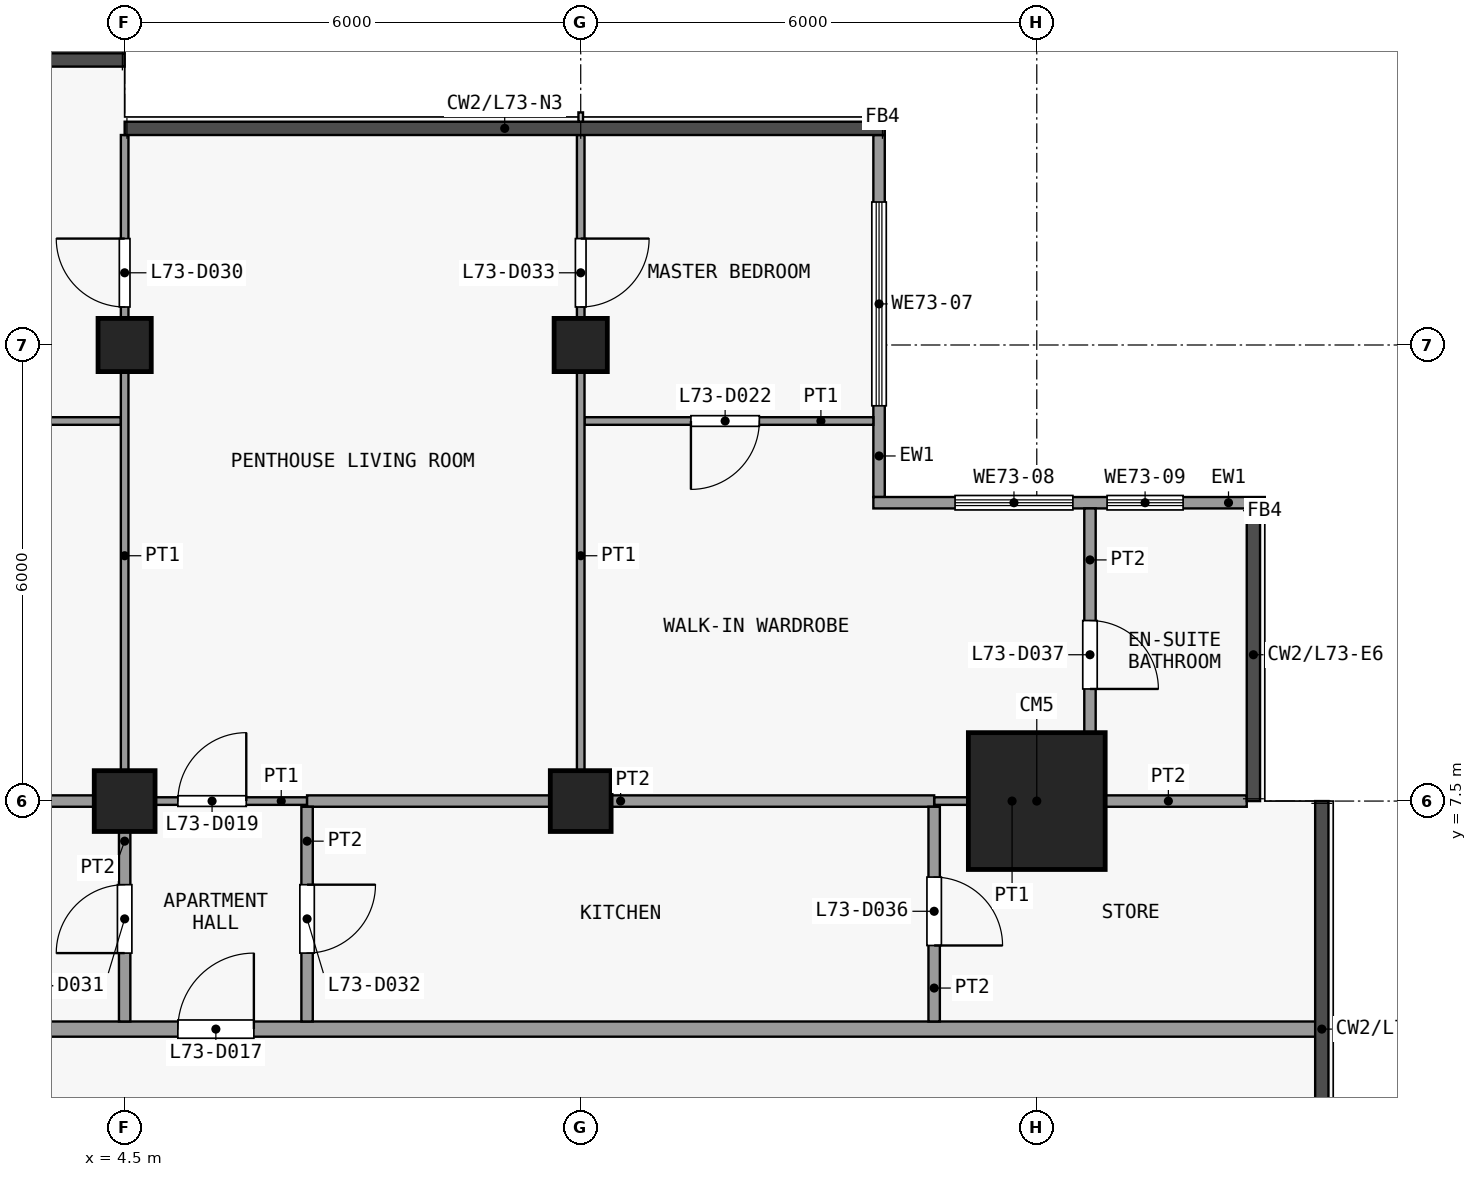
"""IFC4 building model, lengths in metres.
Left out: names, types, materials, properties, quantities, classifications, styles, units other than length and angle.
Written with IfcOpenShell. Run it as: python <this file> out.ifc"""

import sys

from ifc_helpers import new_model, si_unit, direction, frame, frame_2d, origin, origin_2d, place, context, subcontext, project, spatial, rectangle, extrude, element, fill, save


model = new_model("IFC4")
c1 = context("Model", 3, precision=1e-05, world=origin(), true_north=direction((0.0, 1.0)))
c2 = subcontext(c1, "Body", "Model", "MODEL_VIEW")
j1 = project(units=[si_unit("LENGTHUNIT", "METRE"), si_unit("PLANEANGLEUNIT", "RADIAN")], contexts=[c1])
p1 = place(None, origin())
s1 = spatial("IfcSite", under=j1, at=p1, CompositionType="ELEMENT")
p2 = place(p1, origin())
s2 = spatial("IfcBuilding", under=s1, at=p2, CompositionType="ELEMENT")
p3 = place(p2, frame((0.0, 0.0, 287.9)))
s3 = spatial("IfcBuildingStorey", under=s2, at=p3, CompositionType="ELEMENT", Elevation=287.9)
p4 = place(p3, frame((4.5, 7.5, 0.0), z_axis=(0.0, 0.0, 1.0), x_axis=(1.0, 0.0, 0.0)))
e1 = element("IfcColumn", 1, at=p4, inside=s3, PredefinedType="COLUMN", context=c2, shape_type="SweptSolid", body=[
    extrude(rectangle(XDim=0.8, YDim=0.8, at=origin_2d()), origin(), (0.0, 0.0, 1.0), 3.6),
])
p5 = place(p3, frame((4.5, 13.5, 0.0), z_axis=(0.0, 0.0, 1.0), x_axis=(1.0, 0.0, 0.0)))
e2 = element("IfcColumn", 2, at=p5, inside=s3, PredefinedType="COLUMN", context=c2, shape_type="SweptSolid", body=[
    extrude(rectangle(XDim=0.7, YDim=0.7, at=origin_2d()), origin(), (0.0, 0.0, 1.0), 3.6),
])
p6 = place(p3, frame((10.5, 7.5, 0.0), z_axis=(0.0, 0.0, 1.0), x_axis=(1.0, 0.0, 0.0)))
e3 = element("IfcColumn", 3, at=p6, inside=s3, PredefinedType="COLUMN", context=c2, shape_type="SweptSolid", body=[
    extrude(rectangle(XDim=0.8, YDim=0.8, at=origin_2d()), origin(), (0.0, 0.0, 1.0), 3.6),
])
p7 = place(p3, frame((10.5, 13.5, 0.0), z_axis=(0.0, 0.0, 1.0), x_axis=(1.0, 0.0, 0.0)))
e4 = element("IfcColumn", 4, at=p7, inside=s3, PredefinedType="COLUMN", context=c2, shape_type="SweptSolid", body=[
    extrude(rectangle(XDim=0.7, YDim=0.7, at=origin_2d()), origin(), (0.0, 0.0, 1.0), 3.6),
])
p8 = place(p3, frame((16.5, 7.5, 0.0), z_axis=(0.0, 0.0, 1.0), x_axis=(1.0, 0.0, 0.0)))
e5 = element("IfcColumn", 5, at=p8, inside=s3, PredefinedType="COLUMN", context=c2, shape_type="SweptSolid", body=[
    extrude(rectangle(XDim=1.8, YDim=1.8, at=origin_2d()), origin(), (0.0, 0.0, 1.0), 3.6),
])
p9 = place(p3, frame((14.425, 16.262, 0.0), z_axis=(0.0, 0.0, 1.0), x_axis=(0.0, -1.0, 0.0)))
e6 = element("IfcWall", 6, at=p9, inside=s3, PredefinedType="SOLIDWALL", context=c2, shape_type="SweptSolid", body=[
    extrude(rectangle(XDim=4.762, YDim=0.15, at=frame_2d((2.381, 0.0))), origin(), (0.0, 0.0, 1.0), 3.3),
])
p10 = place(p9, frame((0.881, 0.0, 0.9)))
e7 = element("IfcOpeningElement", 7, at=p10, cuts=e6, PredefinedType="OPENING", context=c2, shape_type="SweptSolid", body=[
    extrude(rectangle(XDim=2.681, YDim=2.4, at=frame_2d((1.34, 1.2))), frame((0.0, 0.085, 0.0), z_axis=(0.0, -1.0, 0.0), x_axis=(1.0, 0.0, 0.0)), (0.0, 0.0, 1.0), 0.17),
])
p11 = place(p3, frame((14.35, 11.425, 0.0), z_axis=(0.0, 0.0, 1.0), x_axis=(1.0, 0.0, 0.0)))
e8 = element("IfcWall", 8, at=p11, inside=s3, PredefinedType="SOLIDWALL", context=c2, shape_type="SweptSolid", body=[
    extrude(rectangle(XDim=5.15, YDim=0.15, at=frame_2d((2.575, 0.0))), origin(), (0.0, 0.0, 1.0), 3.3),
])
p12 = place(p11, frame((1.075, 0.0, 0.9)))
e9 = element("IfcOpeningElement", 9, at=p12, cuts=e8, PredefinedType="OPENING", context=c2, shape_type="SweptSolid", body=[
    extrude(rectangle(XDim=1.55, YDim=2.4, at=frame_2d((0.775, 1.2))), frame((0.0, 0.085, 0.0), z_axis=(0.0, -1.0, 0.0), x_axis=(1.0, 0.0, 0.0)), (0.0, 0.0, 1.0), 0.17),
])
p13 = place(p11, frame((3.075, 0.0, 0.9)))
e10 = element("IfcOpeningElement", 10, at=p13, cuts=e8, PredefinedType="OPENING", context=c2, shape_type="SweptSolid", body=[
    extrude(rectangle(XDim=1.0, YDim=2.4, at=frame_2d((0.5, 1.2))), frame((0.0, 0.085, 0.0), z_axis=(0.0, -1.0, 0.0), x_axis=(1.0, 0.0, 0.0)), (0.0, 0.0, 1.0), 0.17),
])
p14 = place(p3, frame((-19.35, 4.5, 0.0), z_axis=(0.0, 0.0, 1.0), x_axis=(1.0, 0.0, 0.0)))
e11 = element("IfcWall", 11, at=p14, inside=s3, PredefinedType="PARTITIONING", context=c2, shape_type="SweptSolid", body=[
    extrude(rectangle(XDim=39.6, YDim=0.2, at=frame_2d((19.8, 0.0))), origin(), (0.0, 0.0, 1.0), 3.3),
])
p15 = place(p14, frame((7.05, 0.0, 0.0)))
e12 = element("IfcOpeningElement", 12, at=p15, cuts=e11, PredefinedType="OPENING", context=c2, shape_type="SweptSolid", body=[
    extrude(rectangle(XDim=1.0, YDim=2.1, at=frame_2d((0.5, 1.05))), frame((0.0, 0.11, 0.0), z_axis=(0.0, -1.0, 0.0), x_axis=(1.0, 0.0, 0.0)), (0.0, 0.0, 1.0), 0.22),
])
p16 = place(p14, frame((24.55, 0.0, 0.0)))
e13 = element("IfcOpeningElement", 13, at=p16, cuts=e11, PredefinedType="OPENING", context=c2, shape_type="SweptSolid", body=[
    extrude(rectangle(XDim=1.0, YDim=2.1, at=frame_2d((0.5, 1.05))), frame((0.0, 0.11, 0.0), z_axis=(0.0, -1.0, 0.0), x_axis=(1.0, 0.0, 0.0)), (0.0, 0.0, 1.0), 0.22),
])
p17 = place(p3, frame((4.5, 7.5, 0.0), z_axis=(0.0, 0.0, 1.0), x_axis=(1.0, 0.0, 0.0)))
e14 = element("IfcWall", 14, at=p17, inside=s3, PredefinedType="PARTITIONING", context=c2, shape_type="SweptSolid", body=[
    extrude(rectangle(XDim=2.4, YDim=0.1, at=frame_2d((1.2, 0.0))), origin(), (0.0, 0.0, 1.0), 3.3),
])
p18 = place(p17, frame((0.7, 0.0, 0.0)))
e15 = element("IfcOpeningElement", 15, at=p18, cuts=e14, PredefinedType="OPENING", context=c2, shape_type="SweptSolid", body=[
    extrude(rectangle(XDim=0.9, YDim=2.1, at=frame_2d((0.45, 1.05))), frame((0.0, 0.06, 0.0), z_axis=(0.0, -1.0, 0.0), x_axis=(1.0, 0.0, 0.0)), (0.0, 0.0, 1.0), 0.12),
])
p19 = place(p3, frame((15.15, 7.5, 0.0), z_axis=(0.0, 0.0, 1.0), x_axis=(1.0, 0.0, 0.0)))
e16 = element("IfcWall", 16, at=p19, inside=s3, PredefinedType="PARTITIONING", context=c2, shape_type="SweptSolid", body=[
    extrude(rectangle(XDim=2.05, YDim=0.1, at=frame_2d((1.025, 0.0))), origin(), (0.0, 0.0, 1.0), 3.3),
])
p20 = place(p3, frame((0.0, 7.5, 0.0), z_axis=(0.0, 0.0, 1.0), x_axis=(1.0, 0.0, 0.0)))
e17 = element("IfcWall", 17, at=p20, inside=s3, PredefinedType="PARTITIONING", context=c2, shape_type="SweptSolid", body=[
    extrude(rectangle(XDim=4.5, YDim=0.15, at=frame_2d((2.25, 0.0))), origin(), (0.0, 0.0, 1.0), 3.3),
])
p21 = place(p3, frame((6.9, 7.5, 0.0), z_axis=(0.0, 0.0, 1.0), x_axis=(1.0, 0.0, 0.0)))
e18 = element("IfcWall", 18, at=p21, inside=s3, PredefinedType="PARTITIONING", context=c2, shape_type="SweptSolid", body=[
    extrude(rectangle(XDim=8.25, YDim=0.15, at=frame_2d((4.125, 0.0))), origin(), (0.0, 0.0, 1.0), 3.3),
])
p22 = place(p3, frame((17.2, 7.5, 0.0), z_axis=(0.0, 0.0, 1.0), x_axis=(1.0, 0.0, 0.0)))
e19 = element("IfcWall", 19, at=p22, inside=s3, PredefinedType="PARTITIONING", context=c2, shape_type="SweptSolid", body=[
    extrude(rectangle(XDim=2.062, YDim=0.15, at=frame_2d((1.031, 0.0))), origin(), (0.0, 0.0, 1.0), 3.3),
])
p23 = place(p3, frame((-4.4, 12.5, 0.0), z_axis=(0.0, 0.0, 1.0), x_axis=(1.0, 0.0, 0.0)))
e20 = element("IfcWall", 20, at=p23, inside=s3, PredefinedType="PARTITIONING", context=c2, shape_type="SweptSolid", body=[
    extrude(rectangle(XDim=8.85, YDim=0.1, at=frame_2d((4.425, 0.0))), origin(), (0.0, 0.0, 1.0), 3.3),
])
p24 = place(p23, frame((4.0, 0.0, 0.0)))
e21 = element("IfcOpeningElement", 21, at=p24, cuts=e20, PredefinedType="OPENING", context=c2, shape_type="SweptSolid", body=[
    extrude(rectangle(XDim=0.9, YDim=2.1, at=frame_2d((0.45, 1.05))), frame((0.0, 0.06, 0.0), z_axis=(0.0, -1.0, 0.0), x_axis=(1.0, 0.0, 0.0)), (0.0, 0.0, 1.0), 0.12),
])
p25 = place(p3, frame((10.55, 12.5, 0.0), z_axis=(0.0, 0.0, 1.0), x_axis=(1.0, 0.0, 0.0)))
e22 = element("IfcWall", 22, at=p25, inside=s3, PredefinedType="PARTITIONING", context=c2, shape_type="SweptSolid", body=[
    extrude(rectangle(XDim=3.8, YDim=0.1, at=frame_2d((1.9, 0.0))), origin(), (0.0, 0.0, 1.0), 3.3),
])
p26 = place(p25, frame((1.4, 0.0, 0.0)))
e23 = element("IfcOpeningElement", 23, at=p26, cuts=e22, PredefinedType="OPENING", context=c2, shape_type="SweptSolid", body=[
    extrude(rectangle(XDim=0.9, YDim=2.1, at=frame_2d((0.45, 1.05))), frame((0.0, 0.06, 0.0), z_axis=(0.0, -1.0, 0.0), x_axis=(1.0, 0.0, 0.0)), (0.0, 0.0, 1.0), 0.12),
])
p27 = place(p3, frame((4.5, 7.575, 0.0), z_axis=(0.0, 0.0, 1.0), x_axis=(0.0, 1.0, 0.0)))
e24 = element("IfcWall", 24, at=p27, inside=s3, PredefinedType="PARTITIONING", context=c2, shape_type="SweptSolid", body=[
    extrude(rectangle(XDim=8.688, YDim=0.1, at=frame_2d((4.344, 0.0))), origin(), (0.0, 0.0, 1.0), 3.3),
])
p28 = place(p27, frame((6.425, 0.0, 0.0)))
e25 = element("IfcOpeningElement", 25, at=p28, cuts=e24, PredefinedType="OPENING", context=c2, shape_type="SweptSolid", body=[
    extrude(rectangle(XDim=0.9, YDim=2.1, at=frame_2d((0.45, 1.05))), frame((0.0, 0.06, 0.0), z_axis=(0.0, -1.0, 0.0), x_axis=(1.0, 0.0, 0.0)), (0.0, 0.0, 1.0), 0.12),
])
p29 = place(p3, frame((4.5, 4.6, 0.0), z_axis=(0.0, 0.0, 1.0), x_axis=(0.0, 1.0, 0.0)))
e26 = element("IfcWall", 26, at=p29, inside=s3, PredefinedType="PARTITIONING", context=c2, shape_type="SweptSolid", body=[
    extrude(rectangle(XDim=2.825, YDim=0.15, at=frame_2d((1.413, 0.0))), origin(), (0.0, 0.0, 1.0), 3.3),
])
p30 = place(p29, frame((0.9, 0.0, 0.0)))
e27 = element("IfcOpeningElement", 27, at=p30, cuts=e26, PredefinedType="OPENING", context=c2, shape_type="SweptSolid", body=[
    extrude(rectangle(XDim=0.9, YDim=2.1, at=frame_2d((0.45, 1.05))), frame((0.0, 0.085, 0.0), z_axis=(0.0, -1.0, 0.0), x_axis=(1.0, 0.0, 0.0)), (0.0, 0.0, 1.0), 0.17),
])
p31 = place(p3, frame((6.9, 4.6, 0.0), z_axis=(0.0, 0.0, 1.0), x_axis=(0.0, 1.0, 0.0)))
e28 = element("IfcWall", 28, at=p31, inside=s3, PredefinedType="PARTITIONING", context=c2, shape_type="SweptSolid", body=[
    extrude(rectangle(XDim=2.825, YDim=0.15, at=frame_2d((1.413, 0.0))), origin(), (0.0, 0.0, 1.0), 3.3),
])
p32 = place(p31, frame((0.9, 0.0, 0.0)))
e29 = element("IfcOpeningElement", 29, at=p32, cuts=e28, PredefinedType="OPENING", context=c2, shape_type="SweptSolid", body=[
    extrude(rectangle(XDim=0.9, YDim=2.1, at=frame_2d((0.45, 1.05))), frame((0.0, 0.085, 0.0), z_axis=(0.0, -1.0, 0.0), x_axis=(1.0, 0.0, 0.0)), (0.0, 0.0, 1.0), 0.17),
])
p33 = place(p3, frame((10.5, 7.575, 0.0), z_axis=(0.0, 0.0, 1.0), x_axis=(0.0, 1.0, 0.0)))
e30 = element("IfcWall", 30, at=p33, inside=s3, PredefinedType="PARTITIONING", context=c2, shape_type="SweptSolid", body=[
    extrude(rectangle(XDim=8.688, YDim=0.1, at=frame_2d((4.344, 0.0))), origin(), (0.0, 0.0, 1.0), 3.3),
])
p34 = place(p33, frame((6.425, 0.0, 0.0)))
e31 = element("IfcOpeningElement", 31, at=p34, cuts=e30, PredefinedType="OPENING", context=c2, shape_type="SweptSolid", body=[
    extrude(rectangle(XDim=0.9, YDim=2.1, at=frame_2d((0.45, 1.05))), frame((0.0, 0.06, 0.0), z_axis=(0.0, -1.0, 0.0), x_axis=(1.0, 0.0, 0.0)), (0.0, 0.0, 1.0), 0.12),
])
p35 = place(p3, frame((15.15, 4.6, 0.0), z_axis=(0.0, 0.0, 1.0), x_axis=(0.0, 1.0, 0.0)))
e32 = element("IfcWall", 32, at=p35, inside=s3, PredefinedType="PARTITIONING", context=c2, shape_type="SweptSolid", body=[
    extrude(rectangle(XDim=2.825, YDim=0.15, at=frame_2d((1.413, 0.0))), origin(), (0.0, 0.0, 1.0), 3.3),
])
p36 = place(p35, frame((1.0, 0.0, 0.0)))
e33 = element("IfcOpeningElement", 33, at=p36, cuts=e32, PredefinedType="OPENING", context=c2, shape_type="SweptSolid", body=[
    extrude(rectangle(XDim=0.9, YDim=2.1, at=frame_2d((0.45, 1.05))), frame((0.0, 0.085, 0.0), z_axis=(0.0, -1.0, 0.0), x_axis=(1.0, 0.0, 0.0)), (0.0, 0.0, 1.0), 0.17),
])
p37 = place(p3, frame((17.2, 7.575, 0.0), z_axis=(0.0, 0.0, 1.0), x_axis=(0.0, 1.0, 0.0)))
e34 = element("IfcWall", 34, at=p37, inside=s3, PredefinedType="PARTITIONING", context=c2, shape_type="SweptSolid", body=[
    extrude(rectangle(XDim=3.775, YDim=0.15, at=frame_2d((1.888, 0.0))), origin(), (0.0, 0.0, 1.0), 3.3),
])
p38 = place(p37, frame((1.4, 0.0, 0.0)))
e35 = element("IfcOpeningElement", 35, at=p38, cuts=e34, PredefinedType="OPENING", context=c2, shape_type="SweptSolid", body=[
    extrude(rectangle(XDim=0.9, YDim=2.1, at=frame_2d((0.45, 1.05))), frame((0.0, 0.085, 0.0), z_axis=(0.0, -1.0, 0.0), x_axis=(1.0, 0.0, 0.0)), (0.0, 0.0, 1.0), 0.17),
])
p39 = place(p10, origin())
e36 = element("IfcWindow", 36, at=p39, inside=s3, PartitioningType="SINGLE_PANEL", PredefinedType="WINDOW", context=c2, shape_type="SweptSolid", body=[
    extrude(rectangle(XDim=2.681, YDim=2.4, at=frame_2d((1.34, 1.2))), frame((0.0, 0.03, 0.0), z_axis=(0.0, -1.0, 0.0), x_axis=(1.0, 0.0, 0.0)), (0.0, 0.0, 1.0), 0.06),
])
fill(e7, e36)
p40 = place(p12, origin())
e37 = element("IfcWindow", 37, at=p40, inside=s3, PartitioningType="SINGLE_PANEL", PredefinedType="WINDOW", context=c2, shape_type="SweptSolid", body=[
    extrude(rectangle(XDim=1.55, YDim=2.4, at=frame_2d((0.775, 1.2))), frame((0.0, 0.03, 0.0), z_axis=(0.0, -1.0, 0.0), x_axis=(1.0, 0.0, 0.0)), (0.0, 0.0, 1.0), 0.06),
])
fill(e9, e37)
p41 = place(p13, origin())
e38 = element("IfcWindow", 38, at=p41, inside=s3, PartitioningType="SINGLE_PANEL", PredefinedType="WINDOW", context=c2, shape_type="SweptSolid", body=[
    extrude(rectangle(XDim=1.0, YDim=2.4, at=frame_2d((0.5, 1.2))), frame((0.0, 0.03, 0.0), z_axis=(0.0, -1.0, 0.0), x_axis=(1.0, 0.0, 0.0)), (0.0, 0.0, 1.0), 0.06),
])
fill(e10, e38)
p42 = place(p16, origin())
e39 = element("IfcDoor", 39, at=p42, inside=s3, OperationType="SINGLE_SWING_LEFT", PredefinedType="DOOR", context=c2, shape_type="SweptSolid", body=[
    extrude(rectangle(XDim=1.0, YDim=2.1, at=frame_2d((0.5, 1.05))), frame((0.0, 0.025, 0.0), z_axis=(0.0, -1.0, 0.0), x_axis=(1.0, 0.0, 0.0)), (0.0, 0.0, 1.0), 0.05),
])
fill(e13, e39)
p43 = place(p18, origin())
e40 = element("IfcDoor", 40, at=p43, inside=s3, OperationType="SINGLE_SWING_LEFT", PredefinedType="DOOR", context=c2, shape_type="SweptSolid", body=[
    extrude(rectangle(XDim=0.9, YDim=2.1, at=frame_2d((0.45, 1.05))), frame((0.0, 0.025, 0.0), z_axis=(0.0, -1.0, 0.0), x_axis=(1.0, 0.0, 0.0)), (0.0, 0.0, 1.0), 0.05),
])
fill(e15, e40)
p44 = place(p26, origin())
e41 = element("IfcDoor", 41, at=p44, inside=s3, OperationType="SINGLE_SWING_LEFT", PredefinedType="DOOR", context=c2, shape_type="SweptSolid", body=[
    extrude(rectangle(XDim=0.9, YDim=2.1, at=frame_2d((0.45, 1.05))), frame((0.0, 0.025, 0.0), z_axis=(0.0, -1.0, 0.0), x_axis=(1.0, 0.0, 0.0)), (0.0, 0.0, 1.0), 0.05),
])
fill(e23, e41)
p45 = place(p28, origin())
e42 = element("IfcDoor", 42, at=p45, inside=s3, OperationType="SINGLE_SWING_LEFT", PredefinedType="DOOR", context=c2, shape_type="SweptSolid", body=[
    extrude(rectangle(XDim=0.9, YDim=2.1, at=frame_2d((0.45, 1.05))), frame((0.0, 0.025, 0.0), z_axis=(0.0, -1.0, 0.0), x_axis=(1.0, 0.0, 0.0)), (0.0, 0.0, 1.0), 0.05),
])
fill(e25, e42)
p46 = place(p30, origin())
e43 = element("IfcDoor", 43, at=p46, inside=s3, OperationType="SINGLE_SWING_RIGHT", PredefinedType="DOOR", context=c2, shape_type="SweptSolid", body=[
    extrude(rectangle(XDim=0.9, YDim=2.1, at=frame_2d((0.45, 1.05))), frame((0.0, 0.025, 0.0), z_axis=(0.0, -1.0, 0.0), x_axis=(1.0, 0.0, 0.0)), (0.0, 0.0, 1.0), 0.05),
])
fill(e27, e43)
p47 = place(p32, origin())
e44 = element("IfcDoor", 44, at=p47, inside=s3, OperationType="SINGLE_SWING_RIGHT", PredefinedType="DOOR", context=c2, shape_type="SweptSolid", body=[
    extrude(rectangle(XDim=0.9, YDim=2.1, at=frame_2d((0.45, 1.05))), frame((0.0, 0.025, 0.0), z_axis=(0.0, -1.0, 0.0), x_axis=(1.0, 0.0, 0.0)), (0.0, 0.0, 1.0), 0.05),
])
fill(e29, e44)
p48 = place(p34, origin())
e45 = element("IfcDoor", 45, at=p48, inside=s3, OperationType="SINGLE_SWING_RIGHT", PredefinedType="DOOR", context=c2, shape_type="SweptSolid", body=[
    extrude(rectangle(XDim=0.9, YDim=2.1, at=frame_2d((0.45, 1.05))), frame((0.0, 0.025, 0.0), z_axis=(0.0, -1.0, 0.0), x_axis=(1.0, 0.0, 0.0)), (0.0, 0.0, 1.0), 0.05),
])
fill(e31, e45)
p49 = place(p36, origin())
e46 = element("IfcDoor", 46, at=p49, inside=s3, OperationType="SINGLE_SWING_LEFT", PredefinedType="DOOR", context=c2, shape_type="SweptSolid", body=[
    extrude(rectangle(XDim=0.9, YDim=2.1, at=frame_2d((0.45, 1.05))), frame((0.0, 0.025, 0.0), z_axis=(0.0, -1.0, 0.0), x_axis=(1.0, 0.0, 0.0)), (0.0, 0.0, 1.0), 0.05),
])
fill(e33, e46)
p50 = place(p38, origin())
e47 = element("IfcDoor", 47, at=p50, inside=s3, OperationType="SINGLE_SWING_LEFT", PredefinedType="DOOR", context=c2, shape_type="SweptSolid", body=[
    extrude(rectangle(XDim=0.9, YDim=2.1, at=frame_2d((0.45, 1.05))), frame((0.0, 0.025, 0.0), z_axis=(0.0, -1.0, 0.0), x_axis=(1.0, 0.0, 0.0)), (0.0, 0.0, 1.0), 0.05),
])
fill(e35, e47)
save(model, sys.argv[1])
